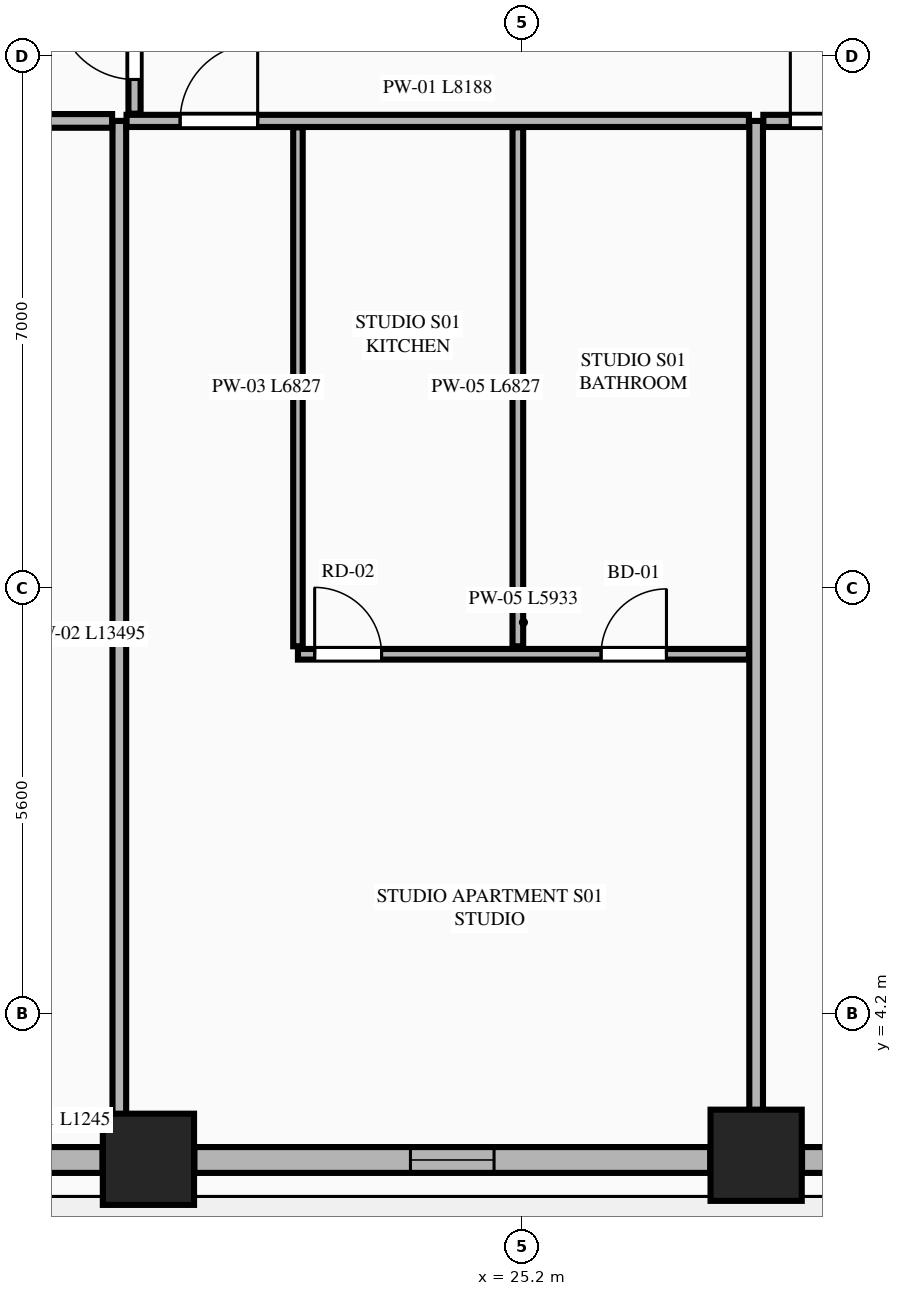
"""IFC4 building model, lengths in metres.
Left out: names, types, materials, properties, quantities, classifications, styles, units other than length and angle.
Written with IfcOpenShell. Run it as: python <this file> out.ifc"""

import sys

from ifc_helpers import new_model, si_unit, direction, frame, frame_2d, origin, origin_2d, place, context, subcontext, project, spatial, rectangle, extrude, element, fill, save


model = new_model("IFC4")
c1 = context("Model", 3, precision=1e-05, world=origin(), true_north=direction((0.0, 1.0)))
c2 = subcontext(c1, "Body", "Model", "MODEL_VIEW")
j1 = project(units=[si_unit("LENGTHUNIT", "METRE"), si_unit("PLANEANGLEUNIT", "RADIAN")], contexts=[c1])
p1 = place(None, origin())
s1 = spatial("IfcSite", under=j1, at=p1, CompositionType="ELEMENT")
p2 = place(p1, origin())
s2 = spatial("IfcBuilding", under=s1, at=p2, CompositionType="ELEMENT")
p3 = place(p2, frame((0.0, 0.0, 32.0)))
s3 = spatial("IfcBuildingStorey", under=s2, at=p3, CompositionType="ELEMENT", Elevation=32.0)
for number, where, z_axis, x_axis in (
    (1, (20.283, 2.289, 0.0), (0.0, 0.0, 1.0), (1.0, 0.0, 0.0)),
    (2, (28.278, 2.342, 0.0), (0.0, 0.0, 1.0), (1.0, 0.0, 0.0)),
):
    element("IfcColumn", number, at=place(p3, frame(where, z_axis=z_axis, x_axis=x_axis)), inside=s3, PredefinedType="COLUMN", context=c2, shape_type="SweptSolid", body=[
        extrude(rectangle(XDim=1.2, YDim=1.2, at=origin_2d()), origin(), (0.0, 0.0, 1.0), 3.55),
    ])
p4 = place(p3, frame((18.434, 2.28, 0.0), z_axis=(0.0, 0.0, 1.0), x_axis=(1.0, 0.0, 0.0)))
e3 = element("IfcWall", 3, at=p4, inside=s3, PredefinedType="STANDARD", context=c2, shape_type="SweptSolid", body=[
    extrude(rectangle(XDim=1.245, YDim=0.34, at=frame_2d((0.623, 0.0))), origin(), (0.0, 0.0, 1.0), 3.33),
])
p5 = place(p3, frame((20.887, 2.28, 0.0), z_axis=(0.0, 0.0, 1.0), x_axis=(1.0, 0.0, 0.0)))
e4 = element("IfcWall", 4, at=p5, inside=s3, PredefinedType="STANDARD", context=c2, shape_type="SweptSolid", body=[
    extrude(rectangle(XDim=6.787, YDim=0.34, at=frame_2d((3.394, 0.0))), origin(), (0.0, 0.0, 1.0), 2.787),
])
p6 = place(p5, frame((2.843, 0.0, 0.75)))
e5 = element("IfcOpeningElement", 5, at=p6, cuts=e4, PredefinedType="OPENING", context=c2, shape_type="SweptSolid", body=[
    extrude(rectangle(XDim=1.1, YDim=1.887, at=frame_2d((0.55, 0.943))), frame((0.0, 0.18, 0.0), z_axis=(0.0, -1.0, 0.0), x_axis=(1.0, 0.0, 0.0)), (0.0, 0.0, 1.0), 0.36),
])
p7 = place(p3, frame((28.882, 2.28, 0.0), z_axis=(0.0, 0.0, 1.0), x_axis=(1.0, 0.0, 0.0)))
e6 = element("IfcWall", 6, at=p7, inside=s3, PredefinedType="STANDARD", context=c2, shape_type="SweptSolid", body=[
    extrude(rectangle(XDim=7.036, YDim=0.34, at=frame_2d((3.518, 0.0))), origin(), (0.0, 0.0, 1.0), 2.787),
])
p8 = place(p7, frame((2.397, 0.0, 0.0)))
e7 = element("IfcOpeningElement", 7, at=p8, cuts=e6, PredefinedType="OPENING", context=c2, shape_type="SweptSolid", body=[
    extrude(rectangle(XDim=1.1, YDim=2.25, at=frame_2d((0.55, 1.125))), frame((0.0, 0.18, 0.0), z_axis=(0.0, -1.0, 0.0), x_axis=(1.0, 0.0, 0.0)), (0.0, 0.0, 1.0), 0.36),
])
p9 = place(p3, frame((19.9, 2.455, 0.0), z_axis=(0.0, 0.0, 1.0), x_axis=(0.0, 1.0, 0.0)))
e8 = element("IfcWall", 8, at=p9, inside=s3, PredefinedType="PARTITIONING", context=c2, shape_type="SweptSolid", body=[
    extrude(rectangle(XDim=13.495, YDim=0.18, at=frame_2d((6.748, 0.0))), origin(), (0.0, 0.0, 1.0), 3.33),
])
p10 = place(p3, frame((28.278, 2.455, 0.0), z_axis=(0.0, 0.0, 1.0), x_axis=(0.0, 1.0, 0.0)))
e9 = element("IfcWall", 9, at=p10, inside=s3, PredefinedType="PARTITIONING", context=c2, shape_type="SweptSolid", body=[
    extrude(rectangle(XDim=13.495, YDim=0.18, at=frame_2d((6.748, 0.0))), origin(), (0.0, 0.0, 1.0), 2.636),
])
p11 = place(p3, frame((19.995, 15.95, 0.0), z_axis=(0.0, 0.0, 1.0), x_axis=(1.0, 0.0, 0.0)))
e10 = element("IfcWall", 10, at=p11, inside=s3, PredefinedType="PARTITIONING", context=c2, shape_type="SweptSolid", body=[
    extrude(rectangle(XDim=8.188, YDim=0.16, at=frame_2d((4.094, 0.0))), origin(), (0.0, 0.0, 1.0), 3.33),
])
p12 = place(p11, frame((0.705, 0.0, 0.0)))
e11 = element("IfcOpeningElement", 11, at=p12, cuts=e10, PredefinedType="OPENING", context=c2, shape_type="SweptSolid", body=[
    extrude(rectangle(XDim=1.02, YDim=2.25, at=frame_2d((0.51, 1.125))), frame((0.0, 0.09, 0.0), z_axis=(0.0, -1.0, 0.0), x_axis=(1.0, 0.0, 0.0)), (0.0, 0.0, 1.0), 0.18),
])
p13 = place(p3, frame((22.25, 9.038, 0.0), z_axis=(0.0, 0.0, 1.0), x_axis=(0.0, 1.0, 0.0)))
e12 = element("IfcWall", 12, at=p13, inside=s3, PredefinedType="PARTITIONING", context=c2, shape_type="SweptSolid", body=[
    extrude(rectangle(XDim=6.827, YDim=0.125, at=frame_2d((3.414, 0.0))), origin(), (0.0, 0.0, 1.0), 2.636),
])
p14 = place(p3, frame((22.25, 8.933, 0.0), z_axis=(0.0, 0.0, 1.0), x_axis=(1.0, 0.0, 0.0)))
e13 = element("IfcWall", 13, at=p14, inside=s3, PredefinedType="PLUMBINGWALL", context=c2, shape_type="SweptSolid", body=[
    extrude(rectangle(XDim=5.933, YDim=0.14, at=frame_2d((2.967, 0.0))), origin(), (0.0, 0.0, 1.0), 3.33),
])
p15 = place(p14, frame((3.988, 0.0, 0.0)))
e14 = element("IfcOpeningElement", 14, at=p15, cuts=e13, PredefinedType="OPENING", context=c2, shape_type="SweptSolid", body=[
    extrude(rectangle(XDim=0.86, YDim=2.1, at=frame_2d((0.43, 1.05))), frame((0.0, 0.08, 0.0), z_axis=(0.0, -1.0, 0.0), x_axis=(1.0, 0.0, 0.0)), (0.0, 0.0, 1.0), 0.16),
])
p16 = place(p14, frame((0.22, 0.0, 0.0)))
e15 = element("IfcOpeningElement", 15, at=p16, cuts=e13, PredefinedType="OPENING", context=c2, shape_type="SweptSolid", body=[
    extrude(rectangle(XDim=0.88, YDim=2.15, at=frame_2d((0.44, 1.075))), frame((0.0, 0.08, 0.0), z_axis=(0.0, -1.0, 0.0), x_axis=(1.0, 0.0, 0.0)), (0.0, 0.0, 1.0), 0.16),
])
p17 = place(p3, frame((25.143, 9.038, 0.0), z_axis=(0.0, 0.0, 1.0), x_axis=(0.0, 1.0, 0.0)))
e16 = element("IfcWall", 16, at=p17, inside=s3, PredefinedType="PLUMBINGWALL", context=c2, shape_type="SweptSolid", body=[
    extrude(rectangle(XDim=6.827, YDim=0.14, at=frame_2d((3.414, 0.0))), origin(), (0.0, 0.0, 1.0), 3.33),
])
p18 = place(p3, frame((28.373, 15.95, 0.0), z_axis=(0.0, 0.0, 1.0), x_axis=(1.0, 0.0, 0.0)))
e17 = element("IfcWall", 17, at=p18, inside=s3, PredefinedType="PARTITIONING", context=c2, shape_type="SweptSolid", body=[
    extrude(rectangle(XDim=16.432, YDim=0.16, at=frame_2d((8.216, 0.0))), origin(), (0.0, 0.0, 1.0), 3.33),
])
p19 = place(p18, frame((0.355, 0.0, 0.0)))
e18 = element("IfcOpeningElement", 18, at=p19, cuts=e17, PredefinedType="OPENING", context=c2, shape_type="SweptSolid", body=[
    extrude(rectangle(XDim=1.35, YDim=2.35, at=frame_2d((0.675, 1.175))), frame((0.0, 0.09, 0.0), z_axis=(0.0, -1.0, 0.0), x_axis=(1.0, 0.0, 0.0)), (0.0, 0.0, 1.0), 0.18),
])
p20 = place(p3, frame((10.564, 15.95, 0.0), z_axis=(0.0, 0.0, 1.0), x_axis=(1.0, 0.0, 0.0)))
e19 = element("IfcWall", 19, at=p20, inside=s3, PredefinedType="PARTITIONING", context=c2, shape_type="SweptSolid", body=[
    extrude(rectangle(XDim=9.241, YDim=0.18, at=frame_2d((4.621, 0.0))), origin(), (0.0, 0.0, 1.0), 3.33),
])
p21 = place(p3, frame((20.1, 16.045, 0.0), z_axis=(0.0, 0.0, 1.0), x_axis=(0.0, 1.0, 0.0)))
e20 = element("IfcWall", 20, at=p21, inside=s3, PredefinedType="PARTITIONING", context=c2, shape_type="SweptSolid", body=[
    extrude(rectangle(XDim=9.76, YDim=0.16, at=frame_2d((4.88, 0.0))), origin(), (0.0, 0.0, 1.0), 3.33),
])
p22 = place(p21, frame((0.45, 0.0, 0.0)))
e21 = element("IfcOpeningElement", 21, at=p22, cuts=e20, PredefinedType="OPENING", context=c2, shape_type="SweptSolid", body=[
    extrude(rectangle(XDim=1.02, YDim=2.25, at=frame_2d((0.51, 1.125))), frame((0.0, 0.09, 0.0), z_axis=(0.0, -1.0, 0.0), x_axis=(1.0, 0.0, 0.0)), (0.0, 0.0, 1.0), 0.18),
])
p23 = place(p6, origin())
e22 = element("IfcWindow", 22, at=p23, inside=s3, PartitioningType="SINGLE_PANEL", PredefinedType="WINDOW", context=c2, shape_type="SweptSolid", body=[
    extrude(rectangle(XDim=1.1, YDim=1.887, at=frame_2d((0.55, 0.943))), frame((0.0, 0.03, 0.0), z_axis=(0.0, -1.0, 0.0), x_axis=(1.0, 0.0, 0.0)), (0.0, 0.0, 1.0), 0.06),
])
fill(e5, e22)
p24 = place(p15, origin())
e23 = element("IfcDoor", 23, at=p24, inside=s3, OperationType="SINGLE_SWING_RIGHT", PredefinedType="DOOR", context=c2, shape_type="SweptSolid", body=[
    extrude(rectangle(XDim=0.86, YDim=2.1, at=frame_2d((0.43, 1.05))), frame((0.0, 0.025, 0.0), z_axis=(0.0, -1.0, 0.0), x_axis=(1.0, 0.0, 0.0)), (0.0, 0.0, 1.0), 0.05),
])
fill(e14, e23)
p25 = place(p12, origin())
e24 = element("IfcDoor", 24, at=p25, inside=s3, OperationType="SINGLE_SWING_RIGHT", PredefinedType="DOOR", context=c2, shape_type="SweptSolid", body=[
    extrude(rectangle(XDim=1.02, YDim=2.25, at=frame_2d((0.51, 1.125))), frame((0.0, 0.025, 0.0), z_axis=(0.0, -1.0, 0.0), x_axis=(1.0, 0.0, 0.0)), (0.0, 0.0, 1.0), 0.05),
])
fill(e11, e24)
p26 = place(p16, origin())
e25 = element("IfcDoor", 25, at=p26, inside=s3, OperationType="SINGLE_SWING_LEFT", PredefinedType="DOOR", context=c2, shape_type="SweptSolid", body=[
    extrude(rectangle(XDim=0.88, YDim=2.15, at=frame_2d((0.44, 1.075))), frame((0.0, 0.025, 0.0), z_axis=(0.0, -1.0, 0.0), x_axis=(1.0, 0.0, 0.0)), (0.0, 0.0, 1.0), 0.05),
])
fill(e15, e25)
p27 = place(p19, origin())
e26 = element("IfcDoor", 26, at=p27, inside=s3, OperationType="SINGLE_SWING_LEFT", PredefinedType="DOOR", context=c2, shape_type="SweptSolid", body=[
    extrude(rectangle(XDim=1.35, YDim=2.35, at=frame_2d((0.675, 1.175))), frame((0.0, 0.025, 0.0), z_axis=(0.0, -1.0, 0.0), x_axis=(1.0, 0.0, 0.0)), (0.0, 0.0, 1.0), 0.05),
])
fill(e18, e26)
p28 = place(p22, origin())
e27 = element("IfcDoor", 27, at=p28, inside=s3, OperationType="SINGLE_SWING_RIGHT", PredefinedType="DOOR", context=c2, shape_type="SweptSolid", body=[
    extrude(rectangle(XDim=1.02, YDim=2.25, at=frame_2d((0.51, 1.125))), frame((0.0, 0.025, 0.0), z_axis=(0.0, -1.0, 0.0), x_axis=(1.0, 0.0, 0.0)), (0.0, 0.0, 1.0), 0.05),
])
fill(e21, e27)
save(model, sys.argv[1])
